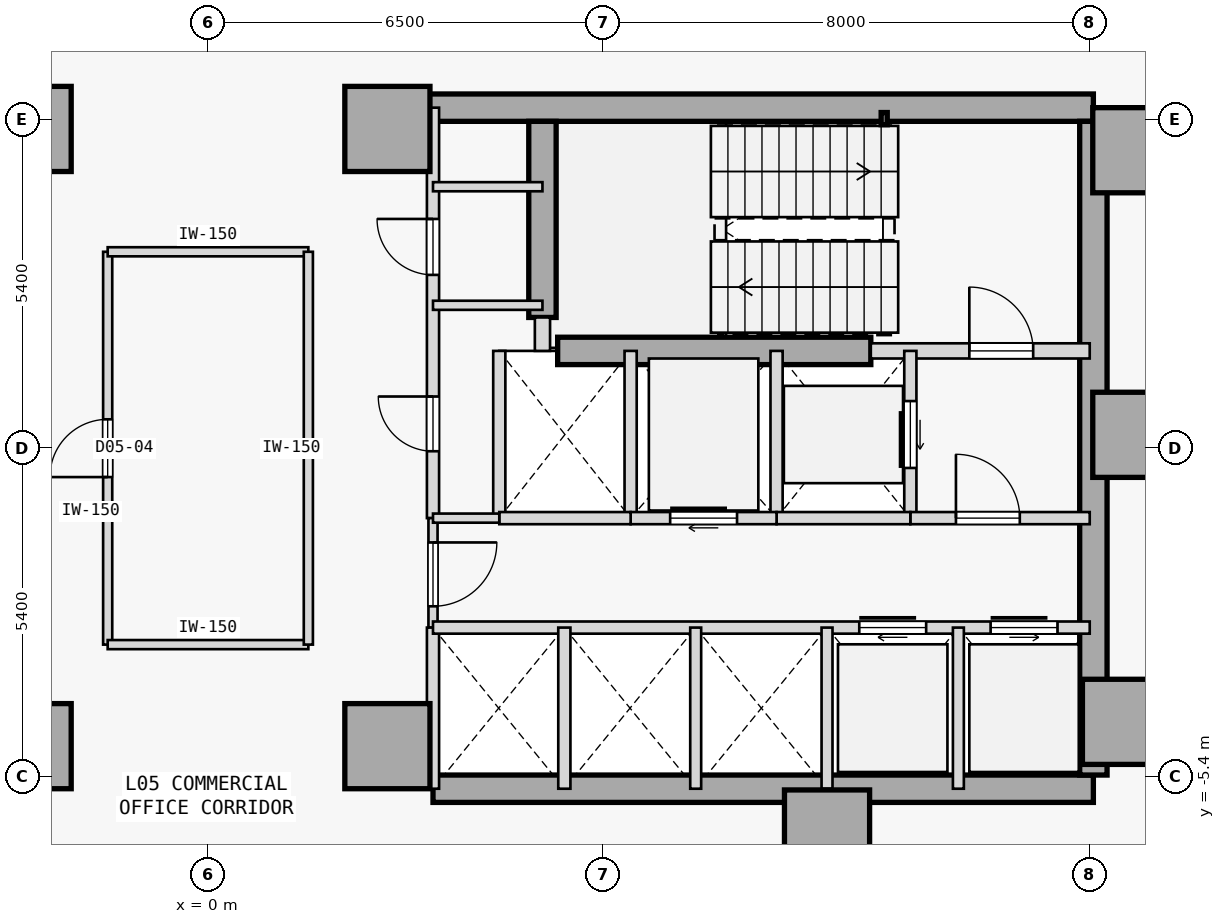
"""IFC4 building model, lengths in metres.
Left out: names, types, materials, properties, quantities, classifications, styles, units other than length and angle.
Written with IfcOpenShell. Run it as: python <this file> out.ifc"""

import sys

from ifc_helpers import new_model, si_unit, direction, frame, frame_2d, origin, origin_2d, place, context, subcontext, project, spatial, rectangle, hollow_rectangle, extrude, element, fill, save


model = new_model("IFC4")
c1 = context("Model", 3, precision=1e-05, world=origin(), true_north=direction((0.0, 1.0)))
c2 = subcontext(c1, "Body", "Model", "MODEL_VIEW")
j1 = project(units=[si_unit("LENGTHUNIT", "METRE"), si_unit("PLANEANGLEUNIT", "RADIAN")], contexts=[c1])
p1 = place(None, origin())
s1 = spatial("IfcSite", under=j1, at=p1, CompositionType="ELEMENT")
p2 = place(p1, origin())
s2 = spatial("IfcBuilding", under=s1, at=p2, CompositionType="ELEMENT")
p3 = place(p2, frame((0.0, 0.0, 25.6)))
s3 = spatial("IfcBuildingStorey", under=s2, at=p3, CompositionType="ELEMENT", Elevation=25.6)
for number, where, z_axis, x_axis in (
    (1, (-2.95, -4.9, 0.0), (0.0, 0.0, 1.0), (1.0, 0.0, 0.0)),
    (2, (-2.95, 5.25, 0.0), (0.0, 0.0, 1.0), (1.0, 0.0, 0.0)),
    (3, (15.25, 4.9, 0.0), (0.0, 0.0, 1.0), (1.0, 0.0, 0.0)),
    (4, (15.25, 0.22, 0.0), (0.0, 0.0, 1.0), (1.0, 0.0, 0.0)),
    (5, (15.08, -4.5, 0.0), (0.0, 0.0, 1.0), (1.0, 0.0, 0.0)),
    (6, (10.18, -6.32, 0.0), (0.0, 0.0, 1.0), (1.0, 0.0, 0.0)),
    (7, (2.95, -4.9, 0.0), (0.0, 0.0, 1.0), (1.0, 0.0, 0.0)),
    (8, (2.95, 5.25, 0.0), (0.0, 0.0, 1.0), (1.0, 0.0, 0.0)),
):
    element("IfcColumn", number, at=place(p3, frame(where, z_axis=z_axis, x_axis=x_axis)), inside=s3, PredefinedType="COLUMN", context=c2, shape_type="SweptSolid", body=[
        extrude(rectangle(XDim=1.4, YDim=1.4, at=origin_2d()), origin(), (0.0, 0.0, 1.0), 3.8),
    ])
p4 = place(p3, frame((3.15, 5.6, 0.0), z_axis=(0.0, 0.0, 1.0), x_axis=(1.0, 0.0, 0.0)))
e9 = element("IfcWall", 9, at=p4, inside=s3, PredefinedType="SHEAR", context=c2, shape_type="SweptSolid", body=[
    extrude(rectangle(XDim=11.41, YDim=0.45, at=frame_2d((5.705, 0.0))), origin(), (0.0, 0.0, 1.0), 3.575),
])
p5 = place(p3, frame((3.7, -5.6, 0.0), z_axis=(0.0, 0.0, 1.0), x_axis=(1.0, 0.0, 0.0)))
e10 = element("IfcWall", 10, at=p5, inside=s3, PredefinedType="SHEAR", context=c2, shape_type="SweptSolid", body=[
    extrude(rectangle(XDim=10.86, YDim=0.45, at=frame_2d((5.43, 0.0))), origin(), (0.0, 0.0, 1.0), 3.575),
])
p6 = place(p3, frame((14.56, -5.375, 0.0), z_axis=(0.0, 0.0, 1.0), x_axis=(0.0, 1.0, 0.0)))
e11 = element("IfcWall", 11, at=p6, inside=s3, PredefinedType="SHEAR", context=c2, shape_type="SweptSolid", body=[
    extrude(rectangle(XDim=10.75, YDim=0.45, at=frame_2d((5.375, 0.0))), origin(), (0.0, 0.0, 1.0), 3.575),
])
p7 = place(p3, frame((5.5, 2.15, 0.0), z_axis=(0.0, 0.0, 1.0), x_axis=(0.0, 1.0, 0.0)))
e12 = element("IfcWall", 12, at=p7, inside=s3, PredefinedType="SHEAR", context=c2, shape_type="SweptSolid", body=[
    extrude(rectangle(XDim=3.225, YDim=0.45, at=frame_2d((1.613, 0.0))), origin(), (0.0, 0.0, 1.0), 3.575),
])
p8 = place(p3, frame((5.75, 1.6, 0.0), z_axis=(0.0, 0.0, 1.0), x_axis=(1.0, 0.0, 0.0)))
e13 = element("IfcWall", 13, at=p8, inside=s3, PredefinedType="SHEAR", context=c2, shape_type="SweptSolid", body=[
    extrude(rectangle(XDim=5.15, YDim=0.45, at=frame_2d((2.575, 0.0))), origin(), (0.0, 0.0, 1.0), 3.575),
])
p9 = place(p3, frame((11.12, 5.42, 0.0), z_axis=(0.0, 0.0, 1.0), x_axis=(1.0, 0.0, 0.0)))
e14 = element("IfcColumn", 14, at=p9, inside=s3, PredefinedType="COLUMN", context=c2, shape_type="SweptSolid", body=[
    extrude(hollow_rectangle(XDim=0.1, YDim=0.2, WallThickness=0.008, at=origin_2d()), origin(), (0.0, 0.0, 1.0), 3.8),
])
p10 = place(p3, frame((10.9, 1.6, 0.0), z_axis=(0.0, 0.0, 1.0), x_axis=(1.0, 0.0, 0.0)))
e15 = element("IfcWall", 15, at=p10, inside=s3, PredefinedType="STANDARD", context=c2, shape_type="SweptSolid", body=[
    extrude(rectangle(XDim=3.6, YDim=0.25, at=frame_2d((1.8, 0.0))), origin(), (0.0, 0.0, 1.0), 3.575),
])
p11 = place(p10, frame((1.62, 0.0, 0.0)))
e16 = element("IfcOpeningElement", 16, at=p11, cuts=e15, PredefinedType="OPENING", context=c2, shape_type="SweptSolid", body=[
    extrude(rectangle(XDim=1.05, YDim=2.15, at=frame_2d((0.525, 1.075))), frame((0.0, 0.135, 0.0), z_axis=(0.0, -1.0, 0.0), x_axis=(1.0, 0.0, 0.0)), (0.0, 0.0, 1.0), 0.27),
])
p12 = place(p3, frame((5.5, 1.6, 0.0), z_axis=(0.0, 0.0, 1.0), x_axis=(0.0, 1.0, 0.0)))
e17 = element("IfcWall", 17, at=p12, inside=s3, PredefinedType="STANDARD", context=c2, shape_type="SweptSolid", body=[
    extrude(rectangle(XDim=0.55, YDim=0.25, at=frame_2d((0.275, 0.0))), origin(), (0.0, 0.0, 1.0), 3.575),
])
p13 = place(p3, frame((3.7, -1.15, 0.0), z_axis=(0.0, 0.0, 1.0), x_axis=(0.0, 1.0, 0.0)))
e18 = element("IfcWall", 18, at=p13, inside=s3, PredefinedType="STANDARD", context=c2, shape_type="SweptSolid", body=[
    extrude(rectangle(XDim=6.75, YDim=0.2, at=frame_2d((3.375, 0.0))), origin(), (0.0, 0.0, 1.0), 3.575),
])
p14 = place(p13, frame((1.1, 0.0, 0.0)))
e19 = element("IfcOpeningElement", 19, at=p14, cuts=e18, PredefinedType="OPENING", context=c2, shape_type="SweptSolid", body=[
    extrude(rectangle(XDim=0.9, YDim=2.15, at=frame_2d((0.45, 1.075))), frame((0.0, 0.11, 0.0), z_axis=(0.0, -1.0, 0.0), x_axis=(1.0, 0.0, 0.0)), (0.0, 0.0, 1.0), 0.22),
])
p15 = place(p13, frame((4.0, 0.0, 0.0)))
e20 = element("IfcOpeningElement", 20, at=p15, cuts=e18, PredefinedType="OPENING", context=c2, shape_type="SweptSolid", body=[
    extrude(rectangle(XDim=0.92, YDim=2.15, at=frame_2d((0.46, 1.075))), frame((0.0, 0.11, 0.0), z_axis=(0.0, -1.0, 0.0), x_axis=(1.0, 0.0, 0.0)), (0.0, 0.0, 1.0), 0.22),
])
p16 = place(p3, frame((3.7, -2.95, 0.0), z_axis=(0.0, 0.0, 1.0), x_axis=(0.0, 1.0, 0.0)))
e21 = element("IfcWall", 21, at=p16, inside=s3, PredefinedType="PARTITIONING", context=c2, shape_type="SweptSolid", body=[
    extrude(rectangle(XDim=1.8, YDim=0.15, at=frame_2d((0.9, 0.0))), origin(), (0.0, 0.0, 1.0), 3.575),
])
p17 = place(p16, frame((0.35, 0.0, 0.0)))
e22 = element("IfcOpeningElement", 22, at=p17, cuts=e21, PredefinedType="OPENING", context=c2, shape_type="SweptSolid", body=[
    extrude(rectangle(XDim=1.05, YDim=2.18, at=frame_2d((0.525, 1.09))), frame((0.0, 0.085, 0.0), z_axis=(0.0, -1.0, 0.0), x_axis=(1.0, 0.0, 0.0)), (0.0, 0.0, 1.0), 0.17),
])
p18 = place(p3, frame((3.7, -5.6, 0.0), z_axis=(0.0, 0.0, 1.0), x_axis=(0.0, 1.0, 0.0)))
e23 = element("IfcWall", 23, at=p18, inside=s3, PredefinedType="STANDARD", context=c2, shape_type="SweptSolid", body=[
    extrude(rectangle(XDim=2.65, YDim=0.2, at=frame_2d((1.325, 0.0))), origin(), (0.0, 0.0, 1.0), 3.575),
])
p19 = place(p3, frame((11.55, -1.15, 0.0), z_axis=(0.0, 0.0, 1.0), x_axis=(0.0, 1.0, 0.0)))
e24 = element("IfcWall", 24, at=p19, inside=s3, PredefinedType="STANDARD", context=c2, shape_type="SweptSolid", body=[
    extrude(rectangle(XDim=2.75, YDim=0.2, at=frame_2d((1.375, 0.0))), origin(), (0.0, 0.0, 1.0), 3.575),
])
p20 = place(p19, frame((0.825, 0.0, 0.0)))
e25 = element("IfcOpeningElement", 25, at=p20, cuts=e24, PredefinedType="OPENING", context=c2, shape_type="SweptSolid", body=[
    extrude(rectangle(XDim=1.1, YDim=2.15, at=frame_2d((0.55, 1.075))), frame((0.0, 0.11, 0.0), z_axis=(0.0, -1.0, 0.0), x_axis=(1.0, 0.0, 0.0)), (0.0, 0.0, 1.0), 0.22),
])
p21 = place(p3, frame((9.35, -1.15, 0.0), z_axis=(0.0, 0.0, 1.0), x_axis=(0.0, 1.0, 0.0)))
e26 = element("IfcWall", 26, at=p21, inside=s3, PredefinedType="STANDARD", context=c2, shape_type="SweptSolid", body=[
    extrude(rectangle(XDim=2.75, YDim=0.2, at=frame_2d((1.375, 0.0))), origin(), (0.0, 0.0, 1.0), 3.575),
])
p22 = place(p3, frame((11.55, -1.15, 0.0), z_axis=(0.0, 0.0, 1.0), x_axis=(1.0, 0.0, 0.0)))
e27 = element("IfcWall", 27, at=p22, inside=s3, PredefinedType="STANDARD", context=c2, shape_type="SweptSolid", body=[
    extrude(rectangle(XDim=2.95, YDim=0.2, at=frame_2d((1.475, 0.0))), origin(), (0.0, 0.0, 1.0), 3.575),
])
p23 = place(p22, frame((0.75, 0.0, 0.0)))
e28 = element("IfcOpeningElement", 28, at=p23, cuts=e27, PredefinedType="OPENING", context=c2, shape_type="SweptSolid", body=[
    extrude(rectangle(XDim=1.05, YDim=2.18, at=frame_2d((0.525, 1.09))), frame((0.0, 0.11, 0.0), z_axis=(0.0, -1.0, 0.0), x_axis=(1.0, 0.0, 0.0)), (0.0, 0.0, 1.0), 0.22),
])
p24 = place(p3, frame((9.35, -1.15, 0.0), z_axis=(0.0, 0.0, 1.0), x_axis=(1.0, 0.0, 0.0)))
e29 = element("IfcWall", 29, at=p24, inside=s3, PredefinedType="STANDARD", context=c2, shape_type="SweptSolid", body=[
    extrude(rectangle(XDim=2.2, YDim=0.2, at=frame_2d((1.1, 0.0))), origin(), (0.0, 0.0, 1.0), 3.575),
])
p25 = place(p3, frame((6.95, -1.15, 0.0), z_axis=(0.0, 0.0, 1.0), x_axis=(0.0, 1.0, 0.0)))
e30 = element("IfcWall", 30, at=p25, inside=s3, PredefinedType="STANDARD", context=c2, shape_type="SweptSolid", body=[
    extrude(rectangle(XDim=2.75, YDim=0.2, at=frame_2d((1.375, 0.0))), origin(), (0.0, 0.0, 1.0), 3.575),
])
p26 = place(p3, frame((6.95, -1.15, 0.0), z_axis=(0.0, 0.0, 1.0), x_axis=(1.0, 0.0, 0.0)))
e31 = element("IfcWall", 31, at=p26, inside=s3, PredefinedType="STANDARD", context=c2, shape_type="SweptSolid", body=[
    extrude(rectangle(XDim=2.4, YDim=0.2, at=frame_2d((1.2, 0.0))), origin(), (0.0, 0.0, 1.0), 3.575),
])
p27 = place(p26, frame((0.65, 0.0, 0.0)))
e32 = element("IfcOpeningElement", 32, at=p27, cuts=e31, PredefinedType="OPENING", context=c2, shape_type="SweptSolid", body=[
    extrude(rectangle(XDim=1.1, YDim=2.15, at=frame_2d((0.55, 1.075))), frame((0.0, 0.11, 0.0), z_axis=(0.0, -1.0, 0.0), x_axis=(1.0, 0.0, 0.0)), (0.0, 0.0, 1.0), 0.22),
])
p28 = place(p3, frame((4.79, -1.15, 0.0), z_axis=(0.0, 0.0, 1.0), x_axis=(0.0, 1.0, 0.0)))
e33 = element("IfcWall", 33, at=p28, inside=s3, PredefinedType="STANDARD", context=c2, shape_type="SweptSolid", body=[
    extrude(rectangle(XDim=2.75, YDim=0.2, at=frame_2d((1.375, 0.0))), origin(), (0.0, 0.0, 1.0), 3.575),
])
p29 = place(p3, frame((4.79, -1.15, 0.0), z_axis=(0.0, 0.0, 1.0), x_axis=(1.0, 0.0, 0.0)))
e34 = element("IfcWall", 34, at=p29, inside=s3, PredefinedType="STANDARD", context=c2, shape_type="SweptSolid", body=[
    extrude(rectangle(XDim=2.16, YDim=0.2, at=frame_2d((1.08, 0.0))), origin(), (0.0, 0.0, 1.0), 3.575),
])
p30 = place(p3, frame((3.7, -1.15, 0.0), z_axis=(0.0, 0.0, 1.0), x_axis=(1.0, 0.0, 0.0)))
e35 = element("IfcWall", 35, at=p30, inside=s3, PredefinedType="PARTITIONING", context=c2, shape_type="SweptSolid", body=[
    extrude(rectangle(XDim=1.09, YDim=0.15, at=frame_2d((0.545, 0.0))), origin(), (0.0, 0.0, 1.0), 3.575),
])
p31 = place(p3, frame((3.7, -2.95, 0.0), z_axis=(0.0, 0.0, 1.0), x_axis=(1.0, 0.0, 0.0)))
e36 = element("IfcWall", 36, at=p31, inside=s3, PredefinedType="STANDARD", context=c2, shape_type="SweptSolid", body=[
    extrude(rectangle(XDim=10.8, YDim=0.2, at=frame_2d((5.4, 0.0))), origin(), (0.0, 0.0, 1.0), 3.575),
])
p32 = place(p31, frame((7.01, 0.0, 0.0)))
e37 = element("IfcOpeningElement", 37, at=p32, cuts=e36, PredefinedType="OPENING", context=c2, shape_type="SweptSolid", body=[
    extrude(rectangle(XDim=1.1, YDim=2.15, at=frame_2d((0.55, 1.075))), frame((0.0, 0.11, 0.0), z_axis=(0.0, -1.0, 0.0), x_axis=(1.0, 0.0, 0.0)), (0.0, 0.0, 1.0), 0.22),
])
p33 = place(p31, frame((9.17, 0.0, 0.0)))
e38 = element("IfcOpeningElement", 38, at=p33, cuts=e36, PredefinedType="OPENING", context=c2, shape_type="SweptSolid", body=[
    extrude(rectangle(XDim=1.1, YDim=2.15, at=frame_2d((0.55, 1.075))), frame((0.0, 0.11, 0.0), z_axis=(0.0, -1.0, 0.0), x_axis=(1.0, 0.0, 0.0)), (0.0, 0.0, 1.0), 0.22),
])
p34 = place(p3, frame((5.86, -5.6, 0.0), z_axis=(0.0, 0.0, 1.0), x_axis=(0.0, 1.0, 0.0)))
e39 = element("IfcWall", 39, at=p34, inside=s3, PredefinedType="STANDARD", context=c2, shape_type="SweptSolid", body=[
    extrude(rectangle(XDim=2.65, YDim=0.2, at=frame_2d((1.325, 0.0))), origin(), (0.0, 0.0, 1.0), 3.575),
])
for number, where, z_axis, x_axis in (
    (40, (12.34, -5.6, 0.0), (0.0, 0.0, 1.0), (0.0, 1.0, 0.0)),
    (41, (10.18, -5.6, 0.0), (0.0, 0.0, 1.0), (0.0, 1.0, 0.0)),
    (42, (8.02, -5.6, 0.0), (0.0, 0.0, 1.0), (0.0, 1.0, 0.0)),
):
    element("IfcWall", number, at=place(p3, frame(where, z_axis=z_axis, x_axis=x_axis)), inside=s3, PredefinedType="STANDARD", context=c2, shape_type="SweptSolid", body=[
        extrude(rectangle(XDim=2.65, YDim=0.18, at=frame_2d((1.325, 0.0))), origin(), (0.0, 0.0, 1.0), 3.575),
    ])
for number, where, z_axis, x_axis in (
    (43, (3.7, 4.3, 0.0), (0.0, 0.0, 1.0), (1.0, 0.0, 0.0)),
    (44, (3.7, 2.35, 0.0), (0.0, 0.0, 1.0), (1.0, 0.0, 0.0)),
):
    element("IfcWall", number, at=place(p3, frame(where, z_axis=z_axis, x_axis=x_axis)), inside=s3, PredefinedType="PARTITIONING", context=c2, shape_type="SweptSolid", body=[
        extrude(rectangle(XDim=1.8, YDim=0.15, at=frame_2d((0.9, 0.0))), origin(), (0.0, 0.0, 1.0), 3.575),
    ])
p35 = place(p3, frame((-1.65, -3.23, 0.0), z_axis=(0.0, 0.0, 1.0), x_axis=(0.0, 1.0, 0.0)))
e45 = element("IfcWall", 45, at=p35, inside=s3, PredefinedType="PARTITIONING", context=c2, shape_type="SweptSolid", body=[
    extrude(rectangle(XDim=6.46, YDim=0.15, at=frame_2d((3.23, 0.0))), origin(), (0.0, 0.0, 1.0), 3.575),
])
p36 = place(p35, frame((2.755, 0.0, 0.0)))
e46 = element("IfcOpeningElement", 46, at=p36, cuts=e45, PredefinedType="OPENING", context=c2, shape_type="SweptSolid", body=[
    extrude(rectangle(XDim=0.95, YDim=2.15, at=frame_2d((0.475, 1.075))), frame((0.0, 0.085, 0.0), z_axis=(0.0, -1.0, 0.0), x_axis=(1.0, 0.0, 0.0)), (0.0, 0.0, 1.0), 0.17),
])
for number, where, z_axis, x_axis in (
    (47, (-1.65, -3.23, 0.0), (0.0, 0.0, 1.0), (1.0, 0.0, 0.0)),
    (48, (-1.65, 3.23, 0.0), (0.0, 0.0, 1.0), (1.0, 0.0, 0.0)),
):
    element("IfcWall", number, at=place(p3, frame(where, z_axis=z_axis, x_axis=x_axis)), inside=s3, PredefinedType="PARTITIONING", context=c2, shape_type="SweptSolid", body=[
        extrude(rectangle(XDim=3.3, YDim=0.15, at=frame_2d((1.65, 0.0))), origin(), (0.0, 0.0, 1.0), 3.575),
    ])
p37 = place(p3, frame((1.65, -3.23, 0.0), z_axis=(0.0, 0.0, 1.0), x_axis=(0.0, 1.0, 0.0)))
e49 = element("IfcWall", 49, at=p37, inside=s3, PredefinedType="PARTITIONING", context=c2, shape_type="SweptSolid", body=[
    extrude(rectangle(XDim=6.46, YDim=0.15, at=frame_2d((3.23, 0.0))), origin(), (0.0, 0.0, 1.0), 3.575),
])
p38 = place(p11, origin())
e50 = element("IfcDoor", 50, at=p38, inside=s3, OperationType="SINGLE_SWING_LEFT", PredefinedType="DOOR", context=c2, shape_type="SweptSolid", body=[
    extrude(rectangle(XDim=1.05, YDim=2.15, at=frame_2d((0.525, 1.075))), frame((0.0, 0.025, 0.0), z_axis=(0.0, -1.0, 0.0), x_axis=(1.0, 0.0, 0.0)), (0.0, 0.0, 1.0), 0.05),
])
fill(e16, e50)
p39 = place(p23, origin())
e51 = element("IfcDoor", 51, at=p39, inside=s3, OperationType="SINGLE_SWING_LEFT", PredefinedType="DOOR", context=c2, shape_type="SweptSolid", body=[
    extrude(rectangle(XDim=1.05, YDim=2.18, at=frame_2d((0.525, 1.09))), frame((0.0, 0.025, 0.0), z_axis=(0.0, -1.0, 0.0), x_axis=(1.0, 0.0, 0.0)), (0.0, 0.0, 1.0), 0.05),
])
fill(e28, e51)
p40 = place(p17, frame((1.05, 0.0, 0.0), z_axis=(0.0, 0.0, 1.0), x_axis=(-1.0, 0.0, 0.0)))
e52 = element("IfcDoor", 52, at=p40, inside=s3, OperationType="SINGLE_SWING_RIGHT", PredefinedType="DOOR", context=c2, shape_type="SweptSolid", body=[
    extrude(rectangle(XDim=1.05, YDim=2.18, at=frame_2d((0.525, 1.09))), frame((0.0, 0.025, 0.0), z_axis=(0.0, -1.0, 0.0), x_axis=(1.0, 0.0, 0.0)), (0.0, 0.0, 1.0), 0.05),
])
fill(e22, e52)
p41 = place(p20, origin())
e53 = element("IfcDoor", 53, at=p41, inside=s3, OperationType="SLIDING_TO_RIGHT", PredefinedType="DOOR", context=c2, shape_type="SweptSolid", body=[
    extrude(rectangle(XDim=1.1, YDim=2.15, at=frame_2d((0.55, 1.075))), frame((0.0, 0.025, 0.0), z_axis=(0.0, -1.0, 0.0), x_axis=(1.0, 0.0, 0.0)), (0.0, 0.0, 1.0), 0.05),
])
fill(e25, e53)
p42 = place(p27, origin())
e54 = element("IfcDoor", 54, at=p42, inside=s3, OperationType="SLIDING_TO_RIGHT", PredefinedType="DOOR", context=c2, shape_type="SweptSolid", body=[
    extrude(rectangle(XDim=1.1, YDim=2.15, at=frame_2d((0.55, 1.075))), frame((0.0, 0.025, 0.0), z_axis=(0.0, -1.0, 0.0), x_axis=(1.0, 0.0, 0.0)), (0.0, 0.0, 1.0), 0.05),
])
fill(e32, e54)
p43 = place(p32, origin())
e55 = element("IfcDoor", 55, at=p43, inside=s3, OperationType="SLIDING_TO_RIGHT", PredefinedType="DOOR", context=c2, shape_type="SweptSolid", body=[
    extrude(rectangle(XDim=1.1, YDim=2.15, at=frame_2d((0.55, 1.075))), frame((0.0, 0.025, 0.0), z_axis=(0.0, -1.0, 0.0), x_axis=(1.0, 0.0, 0.0)), (0.0, 0.0, 1.0), 0.05),
])
fill(e37, e55)
p44 = place(p33, origin())
e56 = element("IfcDoor", 56, at=p44, inside=s3, OperationType="SLIDING_TO_LEFT", PredefinedType="DOOR", context=c2, shape_type="SweptSolid", body=[
    extrude(rectangle(XDim=1.1, YDim=2.15, at=frame_2d((0.55, 1.075))), frame((0.0, 0.025, 0.0), z_axis=(0.0, -1.0, 0.0), x_axis=(1.0, 0.0, 0.0)), (0.0, 0.0, 1.0), 0.05),
])
fill(e38, e56)
p45 = place(p14, origin())
e57 = element("IfcDoor", 57, at=p45, inside=s3, OperationType="SINGLE_SWING_RIGHT", PredefinedType="DOOR", context=c2, shape_type="SweptSolid", body=[
    extrude(rectangle(XDim=0.9, YDim=2.15, at=frame_2d((0.45, 1.075))), frame((0.0, 0.025, 0.0), z_axis=(0.0, -1.0, 0.0), x_axis=(1.0, 0.0, 0.0)), (0.0, 0.0, 1.0), 0.05),
])
fill(e19, e57)
p46 = place(p15, origin())
e58 = element("IfcDoor", 58, at=p46, inside=s3, OperationType="SINGLE_SWING_RIGHT", PredefinedType="DOOR", context=c2, shape_type="SweptSolid", body=[
    extrude(rectangle(XDim=0.92, YDim=2.15, at=frame_2d((0.46, 1.075))), frame((0.0, 0.025, 0.0), z_axis=(0.0, -1.0, 0.0), x_axis=(1.0, 0.0, 0.0)), (0.0, 0.0, 1.0), 0.05),
])
fill(e20, e58)
p47 = place(p36, origin())
e59 = element("IfcDoor", 59, at=p47, inside=s3, OperationType="SINGLE_SWING_LEFT", PredefinedType="DOOR", context=c2, shape_type="SweptSolid", body=[
    extrude(rectangle(XDim=0.95, YDim=2.15, at=frame_2d((0.475, 1.075))), frame((0.0, 0.025, 0.0), z_axis=(0.0, -1.0, 0.0), x_axis=(1.0, 0.0, 0.0)), (0.0, 0.0, 1.0), 0.05),
])
fill(e46, e59)
save(model, sys.argv[1])
